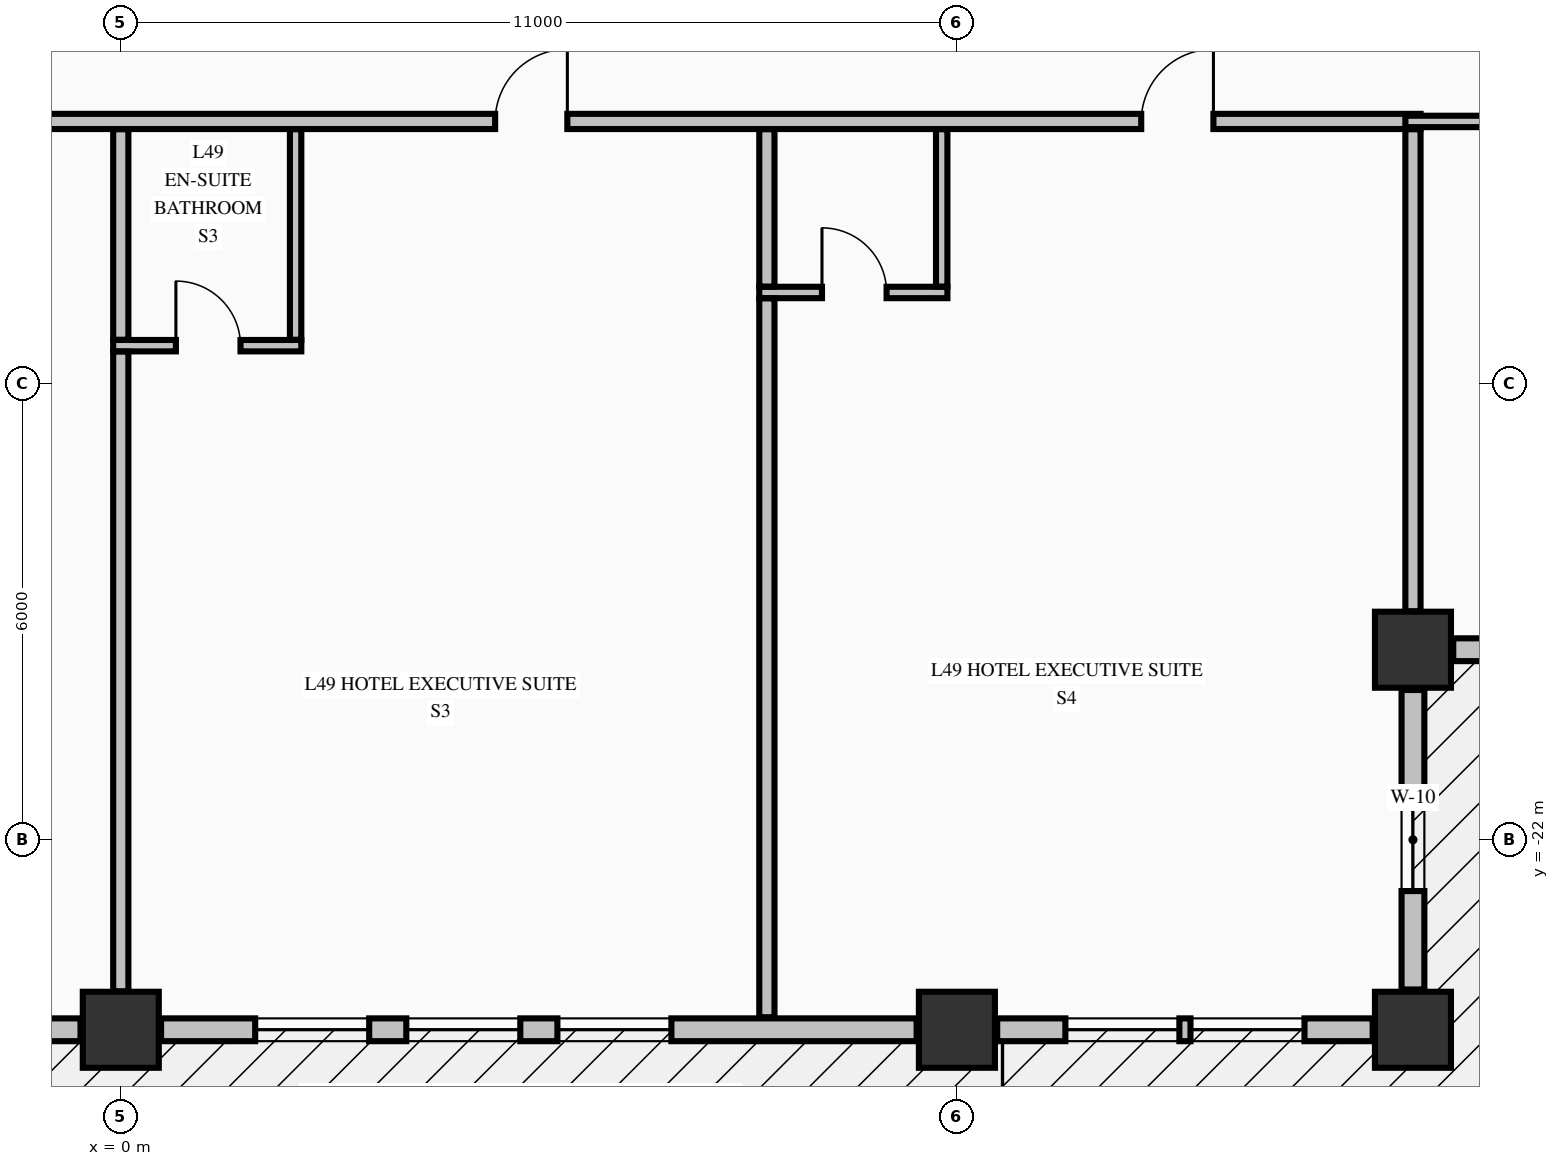
"""IFC4 building model, lengths in metres.
Left out: names, types, materials, properties, quantities, classifications, styles, units other than length and angle.
Written with IfcOpenShell. Run it as: python <this file> out.ifc"""

import sys

from ifc_helpers import new_model, si_unit, direction, frame, frame_2d, origin, origin_2d, place, context, subcontext, project, spatial, rectangle, extrude, element, fill, save


model = new_model("IFC4")
c1 = context("Model", 3, precision=1e-05, world=origin(), true_north=direction((0.0, 1.0)))
c2 = subcontext(c1, "Body", "Model", "MODEL_VIEW")
j1 = project(units=[si_unit("LENGTHUNIT", "METRE"), si_unit("PLANEANGLEUNIT", "RADIAN")], contexts=[c1])
p1 = place(None, origin())
s1 = spatial("IfcSite", under=j1, at=p1, CompositionType="ELEMENT")
p2 = place(p1, origin())
s2 = spatial("IfcBuilding", under=s1, at=p2, CompositionType="ELEMENT")
p3 = place(p2, frame((0.0, 0.0, 191.46)))
s3 = spatial("IfcBuildingStorey", under=s2, at=p3, CompositionType="ELEMENT", Elevation=191.46)
for number, where, z_axis, x_axis in (
    (1, (0.0, -24.5, -0.425), (0.0, 0.0, 1.0), (1.0, 0.0, 0.0)),
    (2, (11.0, -24.5, -0.425), (0.0, 0.0, 1.0), (1.0, 0.0, 0.0)),
    (3, (17.0, -24.5, -0.425), (0.0, 0.0, 1.0), (1.0, 0.0, 0.0)),
    (4, (17.0, -19.5, -0.425), (0.0, 0.0, 1.0), (1.0, 0.0, 0.0)),
):
    element("IfcColumn", number, at=place(p3, frame(where, z_axis=z_axis, x_axis=x_axis)), inside=s3, PredefinedType="COLUMN", context=c2, shape_type="SweptSolid", body=[
        extrude(rectangle(XDim=1.0, YDim=1.0, at=origin_2d()), origin(), (0.0, 0.0, 1.0), 3.55),
    ])
p4 = place(p3, frame((17.0, -23.97, 0.0), z_axis=(0.0, 0.0, 1.0), x_axis=(0.0, 1.0, 0.0)))
e5 = element("IfcWall", 5, at=p4, inside=s3, PredefinedType="STANDARD", context=c2, shape_type="SweptSolid", body=[
    extrude(rectangle(XDim=3.94, YDim=0.3, at=frame_2d((1.97, 0.0))), origin(), (0.0, 0.0, 1.0), 2.517),
])
p5 = place(p4, frame((1.295, 0.0, 0.68)))
e6 = element("IfcOpeningElement", 6, at=p5, cuts=e5, PredefinedType="OPENING", context=c2, shape_type="SweptSolid", body=[
    extrude(rectangle(XDim=1.35, YDim=1.42, at=frame_2d((0.675, 0.71))), frame((0.0, 0.16, 0.0), z_axis=(0.0, -1.0, 0.0), x_axis=(1.0, 0.0, 0.0)), (0.0, 0.0, 1.0), 0.32),
])
p6 = place(p3, frame((17.53, -19.5, 0.0), z_axis=(0.0, 0.0, 1.0), x_axis=(1.0, 0.0, 0.0)))
e7 = element("IfcWall", 7, at=p6, inside=s3, PredefinedType="STANDARD", context=c2, shape_type="SweptSolid", body=[
    extrude(rectangle(XDim=3.94, YDim=0.3, at=frame_2d((1.97, 0.0))), origin(), (0.0, 0.0, 1.0), 2.517),
])
p7 = place(p6, frame((1.295, 0.0, 0.68)))
e8 = element("IfcOpeningElement", 8, at=p7, cuts=e7, PredefinedType="OPENING", context=c2, shape_type="SweptSolid", body=[
    extrude(rectangle(XDim=1.35, YDim=1.42, at=frame_2d((0.675, 0.71))), frame((0.0, 0.16, 0.0), z_axis=(0.0, -1.0, 0.0), x_axis=(1.0, 0.0, 0.0)), (0.0, 0.0, 1.0), 0.32),
])
p8 = place(p3, frame((-10.47, -24.5, 0.0), z_axis=(0.0, 0.0, 1.0), x_axis=(1.0, 0.0, 0.0)))
e9 = element("IfcWall", 9, at=p8, inside=s3, PredefinedType="STANDARD", context=c2, shape_type="SweptSolid", body=[
    extrude(rectangle(XDim=9.94, YDim=0.3, at=frame_2d((4.97, 0.0))), origin(), (0.0, 0.0, 1.0), 2.517),
])
p9 = place(p8, frame((4.42, 0.0, 0.0)))
e10 = element("IfcOpeningElement", 10, at=p9, cuts=e9, PredefinedType="OPENING", context=c2, shape_type="SweptSolid", body=[
    extrude(rectangle(XDim=1.1, YDim=2.15, at=frame_2d((0.55, 1.075))), frame((0.0, 0.16, 0.0), z_axis=(0.0, -1.0, 0.0), x_axis=(1.0, 0.0, 0.0)), (0.0, 0.0, 1.0), 0.32),
])
p10 = place(p8, frame((1.238, 0.0, 0.72)))
e11 = element("IfcOpeningElement", 11, at=p10, cuts=e9, PredefinedType="OPENING", context=c2, shape_type="SweptSolid", body=[
    extrude(rectangle(XDim=1.5, YDim=1.6, at=frame_2d((0.75, 0.8))), frame((0.0, 0.16, 0.0), z_axis=(0.0, -1.0, 0.0), x_axis=(1.0, 0.0, 0.0)), (0.0, 0.0, 1.0), 0.32),
])
p11 = place(p8, frame((7.202, 0.0, 0.72)))
e12 = element("IfcOpeningElement", 12, at=p11, cuts=e9, PredefinedType="OPENING", context=c2, shape_type="SweptSolid", body=[
    extrude(rectangle(XDim=1.5, YDim=1.6, at=frame_2d((0.75, 0.8))), frame((0.0, 0.16, 0.0), z_axis=(0.0, -1.0, 0.0), x_axis=(1.0, 0.0, 0.0)), (0.0, 0.0, 1.0), 0.32),
])
p12 = place(p3, frame((0.53, -24.5, 0.0), z_axis=(0.0, 0.0, 1.0), x_axis=(1.0, 0.0, 0.0)))
e13 = element("IfcWall", 13, at=p12, inside=s3, PredefinedType="STANDARD", context=c2, shape_type="SweptSolid", body=[
    extrude(rectangle(XDim=9.94, YDim=0.3, at=frame_2d((4.97, 0.0))), origin(), (0.0, 0.0, 1.0), 2.517),
])
p13 = place(p12, frame((1.238, 0.0, 0.72)))
e14 = element("IfcOpeningElement", 14, at=p13, cuts=e13, PredefinedType="OPENING", context=c2, shape_type="SweptSolid", body=[
    extrude(rectangle(XDim=1.5, YDim=1.6, at=frame_2d((0.75, 0.8))), frame((0.0, 0.16, 0.0), z_axis=(0.0, -1.0, 0.0), x_axis=(1.0, 0.0, 0.0)), (0.0, 0.0, 1.0), 0.32),
])
p14 = place(p12, frame((3.226, 0.0, 0.72)))
e15 = element("IfcOpeningElement", 15, at=p14, cuts=e13, PredefinedType="OPENING", context=c2, shape_type="SweptSolid", body=[
    extrude(rectangle(XDim=1.5, YDim=1.6, at=frame_2d((0.75, 0.8))), frame((0.0, 0.16, 0.0), z_axis=(0.0, -1.0, 0.0), x_axis=(1.0, 0.0, 0.0)), (0.0, 0.0, 1.0), 0.32),
])
p15 = place(p12, frame((5.214, 0.0, 0.72)))
e16 = element("IfcOpeningElement", 16, at=p15, cuts=e13, PredefinedType="OPENING", context=c2, shape_type="SweptSolid", body=[
    extrude(rectangle(XDim=1.5, YDim=1.6, at=frame_2d((0.75, 0.8))), frame((0.0, 0.16, 0.0), z_axis=(0.0, -1.0, 0.0), x_axis=(1.0, 0.0, 0.0)), (0.0, 0.0, 1.0), 0.32),
])
p16 = place(p3, frame((11.53, -24.5, 0.0), z_axis=(0.0, 0.0, 1.0), x_axis=(1.0, 0.0, 0.0)))
e17 = element("IfcWall", 17, at=p16, inside=s3, PredefinedType="STANDARD", context=c2, shape_type="SweptSolid", body=[
    extrude(rectangle(XDim=4.94, YDim=0.3, at=frame_2d((2.47, 0.0))), origin(), (0.0, 0.0, 1.0), 2.517),
])
p17 = place(p16, frame((0.897, 0.0, 0.72)))
e18 = element("IfcOpeningElement", 18, at=p17, cuts=e17, PredefinedType="OPENING", context=c2, shape_type="SweptSolid", body=[
    extrude(rectangle(XDim=1.5, YDim=1.6, at=frame_2d((0.75, 0.8))), frame((0.0, 0.16, 0.0), z_axis=(0.0, -1.0, 0.0), x_axis=(1.0, 0.0, 0.0)), (0.0, 0.0, 1.0), 0.32),
])
p18 = place(p16, frame((2.543, 0.0, 0.72)))
e19 = element("IfcOpeningElement", 19, at=p18, cuts=e17, PredefinedType="OPENING", context=c2, shape_type="SweptSolid", body=[
    extrude(rectangle(XDim=1.5, YDim=1.6, at=frame_2d((0.75, 0.8))), frame((0.0, 0.16, 0.0), z_axis=(0.0, -1.0, 0.0), x_axis=(1.0, 0.0, 0.0)), (0.0, 0.0, 1.0), 0.32),
])
p19 = place(p3, frame((-0.1, -15.5, 0.0), z_axis=(0.0, 0.0, 1.0), x_axis=(1.0, 0.0, 0.0)))
e20 = element("IfcWall", 20, at=p19, inside=s3, PredefinedType="PARTITIONING", context=c2, shape_type="SweptSolid", body=[
    extrude(rectangle(XDim=2.475, YDim=0.15, at=frame_2d((1.238, 0.0))), origin(), (0.0, 0.0, 1.0), 3.125),
])
p20 = place(p19, frame((0.825, 0.0, 0.0)))
e21 = element("IfcOpeningElement", 21, at=p20, cuts=e20, PredefinedType="OPENING", context=c2, shape_type="SweptSolid", body=[
    extrude(rectangle(XDim=0.85, YDim=2.1, at=frame_2d((0.425, 1.05))), frame((0.0, 0.085, 0.0), z_axis=(0.0, -1.0, 0.0), x_axis=(1.0, 0.0, 0.0)), (0.0, 0.0, 1.0), 0.17),
])
p21 = place(p3, frame((8.4, -14.8, 0.0), z_axis=(0.0, 0.0, 1.0), x_axis=(1.0, 0.0, 0.0)))
e22 = element("IfcWall", 22, at=p21, inside=s3, PredefinedType="PARTITIONING", context=c2, shape_type="SweptSolid", body=[
    extrude(rectangle(XDim=2.475, YDim=0.15, at=frame_2d((1.238, 0.0))), origin(), (0.0, 0.0, 1.0), 3.125),
])
p22 = place(p21, frame((0.825, 0.0, 0.0)))
e23 = element("IfcOpeningElement", 23, at=p22, cuts=e22, PredefinedType="OPENING", context=c2, shape_type="SweptSolid", body=[
    extrude(rectangle(XDim=0.85, YDim=2.1, at=frame_2d((0.425, 1.05))), frame((0.0, 0.085, 0.0), z_axis=(0.0, -1.0, 0.0), x_axis=(1.0, 0.0, 0.0)), (0.0, 0.0, 1.0), 0.17),
])
p23 = place(p3, frame((-22.1, -12.55, 0.0), z_axis=(0.0, 0.0, 1.0), x_axis=(1.0, 0.0, 0.0)))
e24 = element("IfcWall", 24, at=p23, inside=s3, PredefinedType="PARTITIONING", context=c2, shape_type="SweptSolid", body=[
    extrude(rectangle(XDim=39.2, YDim=0.2, at=frame_2d((19.6, 0.0))), origin(), (0.0, 0.0, 1.0), 3.125),
])
p24 = place(p23, frame((6.275, 0.0, 0.0)))
e25 = element("IfcOpeningElement", 25, at=p24, cuts=e24, PredefinedType="OPENING", context=c2, shape_type="SweptSolid", body=[
    extrude(rectangle(XDim=0.95, YDim=2.15, at=frame_2d((0.475, 1.075))), frame((0.0, 0.11, 0.0), z_axis=(0.0, -1.0, 0.0), x_axis=(1.0, 0.0, 0.0)), (0.0, 0.0, 1.0), 0.22),
])
p25 = place(p23, frame((17.275, 0.0, 0.0)))
e26 = element("IfcOpeningElement", 26, at=p25, cuts=e24, PredefinedType="OPENING", context=c2, shape_type="SweptSolid", body=[
    extrude(rectangle(XDim=0.95, YDim=2.15, at=frame_2d((0.475, 1.075))), frame((0.0, 0.11, 0.0), z_axis=(0.0, -1.0, 0.0), x_axis=(1.0, 0.0, 0.0)), (0.0, 0.0, 1.0), 0.22),
])
p26 = place(p23, frame((27.025, 0.0, 0.0)))
e27 = element("IfcOpeningElement", 27, at=p26, cuts=e24, PredefinedType="OPENING", context=c2, shape_type="SweptSolid", body=[
    extrude(rectangle(XDim=0.95, YDim=2.15, at=frame_2d((0.475, 1.075))), frame((0.0, 0.11, 0.0), z_axis=(0.0, -1.0, 0.0), x_axis=(1.0, 0.0, 0.0)), (0.0, 0.0, 1.0), 0.22),
])
p27 = place(p23, frame((35.525, 0.0, 0.0)))
e28 = element("IfcOpeningElement", 28, at=p27, cuts=e24, PredefinedType="OPENING", context=c2, shape_type="SweptSolid", body=[
    extrude(rectangle(XDim=0.95, YDim=2.15, at=frame_2d((0.475, 1.075))), frame((0.0, 0.11, 0.0), z_axis=(0.0, -1.0, 0.0), x_axis=(1.0, 0.0, 0.0)), (0.0, 0.0, 1.0), 0.22),
])
p28 = place(p3, frame((16.9, -12.55, 0.0), z_axis=(0.0, 0.0, 1.0), x_axis=(1.0, 0.0, 0.0)))
e29 = element("IfcWall", 29, at=p28, inside=s3, PredefinedType="PARTITIONING", context=c2, shape_type="SweptSolid", body=[
    extrude(rectangle(XDim=3.175, YDim=0.15, at=frame_2d((1.587, 0.0))), origin(), (0.0, 0.0, 1.0), 3.125),
])
p29 = place(p3, frame((0.0, -23.994, 0.0), z_axis=(0.0, 0.0, 1.0), x_axis=(0.0, 1.0, 0.0)))
e30 = element("IfcWall", 30, at=p29, inside=s3, PredefinedType="PARTITIONING", context=c2, shape_type="SweptSolid", body=[
    extrude(rectangle(XDim=8.416, YDim=0.2, at=frame_2d((4.208, 0.0))), origin(), (0.0, 0.0, 1.0), 2.317),
])
p30 = place(p3, frame((0.0, -15.422, 0.0), z_axis=(0.0, 0.0, 1.0), x_axis=(0.0, 1.0, 0.0)))
e31 = element("IfcWall", 31, at=p30, inside=s3, PredefinedType="PARTITIONING", context=c2, shape_type="SweptSolid", body=[
    extrude(rectangle(XDim=2.769, YDim=0.2, at=frame_2d((1.385, 0.0))), origin(), (0.0, 0.0, 1.0), 2.317),
])
p31 = place(p3, frame((2.3, -15.422, 0.0), z_axis=(0.0, 0.0, 1.0), x_axis=(0.0, 1.0, 0.0)))
e32 = element("IfcWall", 32, at=p31, inside=s3, PredefinedType="PARTITIONING", context=c2, shape_type="SweptSolid", body=[
    extrude(rectangle(XDim=2.769, YDim=0.15, at=frame_2d((1.385, 0.0))), origin(), (0.0, 0.0, 1.0), 3.125),
])
p32 = place(p3, frame((8.5, -24.335, 0.0), z_axis=(0.0, 0.0, 1.0), x_axis=(0.0, 1.0, 0.0)))
e33 = element("IfcWall", 33, at=p32, inside=s3, PredefinedType="PARTITIONING", context=c2, shape_type="SweptSolid", body=[
    extrude(rectangle(XDim=9.457, YDim=0.2, at=frame_2d((4.729, 0.0))), origin(), (0.0, 0.0, 1.0), 3.125),
])
p33 = place(p3, frame((8.5, -14.722, 0.0), z_axis=(0.0, 0.0, 1.0), x_axis=(0.0, 1.0, 0.0)))
e34 = element("IfcWall", 34, at=p33, inside=s3, PredefinedType="PARTITIONING", context=c2, shape_type="SweptSolid", body=[
    extrude(rectangle(XDim=2.069, YDim=0.2, at=frame_2d((1.034, 0.0))), origin(), (0.0, 0.0, 1.0), 3.125),
])
p34 = place(p3, frame((10.8, -14.722, 0.0), z_axis=(0.0, 0.0, 1.0), x_axis=(0.0, 1.0, 0.0)))
e35 = element("IfcWall", 35, at=p34, inside=s3, PredefinedType="PARTITIONING", context=c2, shape_type="SweptSolid", body=[
    extrude(rectangle(XDim=2.069, YDim=0.15, at=frame_2d((1.034, 0.0))), origin(), (0.0, 0.0, 1.0), 2.317),
])
p35 = place(p3, frame((17.0, -18.994, 0.0), z_axis=(0.0, 0.0, 1.0), x_axis=(0.0, 1.0, 0.0)))
e36 = element("IfcWall", 36, at=p35, inside=s3, PredefinedType="PARTITIONING", context=c2, shape_type="SweptSolid", body=[
    extrude(rectangle(XDim=6.341, YDim=0.2, at=frame_2d((3.17, 0.0))), origin(), (0.0, 0.0, 1.0), 3.125),
])
p36 = place(p5, origin())
e37 = element("IfcWindow", 37, at=p36, inside=s3, PartitioningType="SINGLE_PANEL", PredefinedType="WINDOW", context=c2, shape_type="SweptSolid", body=[
    extrude(rectangle(XDim=1.35, YDim=1.42, at=frame_2d((0.675, 0.71))), frame((0.0, 0.03, 0.0), z_axis=(0.0, -1.0, 0.0), x_axis=(1.0, 0.0, 0.0)), (0.0, 0.0, 1.0), 0.06),
])
fill(e6, e37)
p37 = place(p13, origin())
e38 = element("IfcWindow", 38, at=p37, inside=s3, PartitioningType="SINGLE_PANEL", PredefinedType="WINDOW", context=c2, shape_type="SweptSolid", body=[
    extrude(rectangle(XDim=1.5, YDim=1.6, at=frame_2d((0.75, 0.8))), frame((0.0, 0.03, 0.0), z_axis=(0.0, -1.0, 0.0), x_axis=(1.0, 0.0, 0.0)), (0.0, 0.0, 1.0), 0.06),
])
fill(e14, e38)
p38 = place(p14, origin())
e39 = element("IfcWindow", 39, at=p38, inside=s3, PartitioningType="SINGLE_PANEL", PredefinedType="WINDOW", context=c2, shape_type="SweptSolid", body=[
    extrude(rectangle(XDim=1.5, YDim=1.6, at=frame_2d((0.75, 0.8))), frame((0.0, 0.03, 0.0), z_axis=(0.0, -1.0, 0.0), x_axis=(1.0, 0.0, 0.0)), (0.0, 0.0, 1.0), 0.06),
])
fill(e15, e39)
p39 = place(p15, origin())
e40 = element("IfcWindow", 40, at=p39, inside=s3, PartitioningType="SINGLE_PANEL", PredefinedType="WINDOW", context=c2, shape_type="SweptSolid", body=[
    extrude(rectangle(XDim=1.5, YDim=1.6, at=frame_2d((0.75, 0.8))), frame((0.0, 0.03, 0.0), z_axis=(0.0, -1.0, 0.0), x_axis=(1.0, 0.0, 0.0)), (0.0, 0.0, 1.0), 0.06),
])
fill(e16, e40)
p40 = place(p17, origin())
e41 = element("IfcWindow", 41, at=p40, inside=s3, PartitioningType="SINGLE_PANEL", PredefinedType="WINDOW", context=c2, shape_type="SweptSolid", body=[
    extrude(rectangle(XDim=1.5, YDim=1.6, at=frame_2d((0.75, 0.8))), frame((0.0, 0.03, 0.0), z_axis=(0.0, -1.0, 0.0), x_axis=(1.0, 0.0, 0.0)), (0.0, 0.0, 1.0), 0.06),
])
fill(e18, e41)
p41 = place(p18, origin())
e42 = element("IfcWindow", 42, at=p41, inside=s3, PartitioningType="SINGLE_PANEL", PredefinedType="WINDOW", context=c2, shape_type="SweptSolid", body=[
    extrude(rectangle(XDim=1.5, YDim=1.6, at=frame_2d((0.75, 0.8))), frame((0.0, 0.03, 0.0), z_axis=(0.0, -1.0, 0.0), x_axis=(1.0, 0.0, 0.0)), (0.0, 0.0, 1.0), 0.06),
])
fill(e19, e42)
p42 = place(p26, origin())
e43 = element("IfcDoor", 43, at=p42, inside=s3, OperationType="SINGLE_SWING_RIGHT", PredefinedType="DOOR", context=c2, shape_type="SweptSolid", body=[
    extrude(rectangle(XDim=0.95, YDim=2.15, at=frame_2d((0.475, 1.075))), frame((0.0, 0.025, 0.0), z_axis=(0.0, -1.0, 0.0), x_axis=(1.0, 0.0, 0.0)), (0.0, 0.0, 1.0), 0.05),
])
fill(e27, e43)
p43 = place(p20, origin())
e44 = element("IfcDoor", 44, at=p43, inside=s3, OperationType="SINGLE_SWING_LEFT", PredefinedType="DOOR", context=c2, shape_type="SweptSolid", body=[
    extrude(rectangle(XDim=0.85, YDim=2.1, at=frame_2d((0.425, 1.05))), frame((0.0, 0.025, 0.0), z_axis=(0.0, -1.0, 0.0), x_axis=(1.0, 0.0, 0.0)), (0.0, 0.0, 1.0), 0.05),
])
fill(e21, e44)
p44 = place(p27, origin())
e45 = element("IfcDoor", 45, at=p44, inside=s3, OperationType="SINGLE_SWING_RIGHT", PredefinedType="DOOR", context=c2, shape_type="SweptSolid", body=[
    extrude(rectangle(XDim=0.95, YDim=2.15, at=frame_2d((0.475, 1.075))), frame((0.0, 0.025, 0.0), z_axis=(0.0, -1.0, 0.0), x_axis=(1.0, 0.0, 0.0)), (0.0, 0.0, 1.0), 0.05),
])
fill(e28, e45)
p45 = place(p22, origin())
e46 = element("IfcDoor", 46, at=p45, inside=s3, OperationType="SINGLE_SWING_LEFT", PredefinedType="DOOR", context=c2, shape_type="SweptSolid", body=[
    extrude(rectangle(XDim=0.85, YDim=2.1, at=frame_2d((0.425, 1.05))), frame((0.0, 0.025, 0.0), z_axis=(0.0, -1.0, 0.0), x_axis=(1.0, 0.0, 0.0)), (0.0, 0.0, 1.0), 0.05),
])
fill(e23, e46)
save(model, sys.argv[1])
